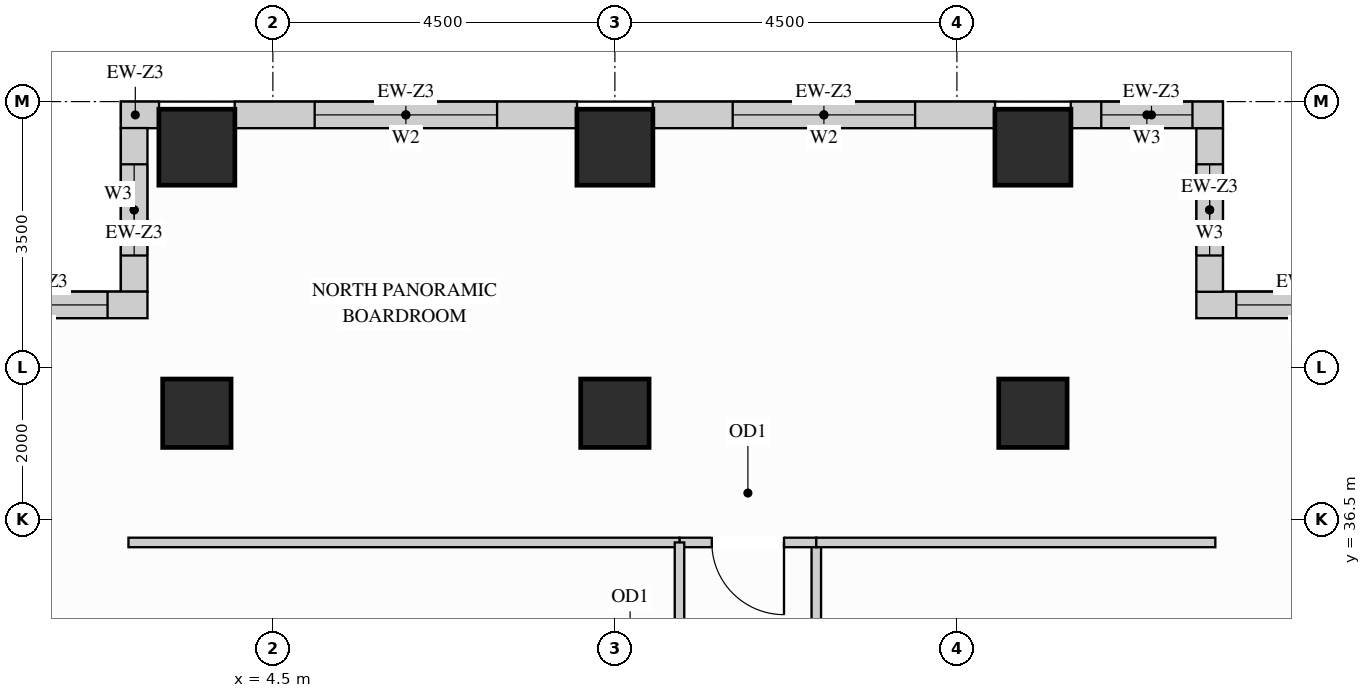
"""IFC4 building model, lengths in metres.
Left out: names, types, materials, properties, quantities, classifications, styles, units other than length and angle.
Written with IfcOpenShell. Run it as: python <this file> out.ifc"""

import sys

from ifc_helpers import new_model, si_unit, direction, frame, frame_2d, origin, origin_2d, place, context, subcontext, project, spatial, rectangle, extrude, source, transform, mapped, element, fill, save


model = new_model("IFC4")
c1 = context("Model", 3, precision=1e-05, world=origin(), true_north=direction((0.0, 1.0)))
c2 = subcontext(c1, "Body", "Model", "MODEL_VIEW")
j1 = project(units=[si_unit("LENGTHUNIT", "METRE"), si_unit("PLANEANGLEUNIT", "RADIAN")], contexts=[c1])
p1 = place(None, origin())
s1 = spatial("IfcSite", under=j1, at=p1, CompositionType="ELEMENT")
p2 = place(p1, origin())
s2 = spatial("IfcBuilding", under=s1, at=p2, CompositionType="ELEMENT")
p3 = place(p2, frame((0.0, 0.0, 179.1)))
s3 = spatial("IfcBuildingStorey", under=s2, at=p3, CompositionType="ELEMENT", Elevation=179.1)
m1 = source(origin(), c2, "Body", "SweptSolid", [
    extrude(rectangle(XDim=0.9, YDim=0.9, at=origin_2d()), origin(), (0.0, 0.0, 1.0), 3.4),
])
for number, where, z_axis, x_axis in (
    (1, (14.5, 37.9, 0.0), (0.0, 0.0, 1.0), (1.0, 0.0, 0.0)),
    (2, (3.5, 37.9, 0.0), (0.0, 0.0, 1.0), (1.0, 0.0, 0.0)),
    (3, (9.0, 37.9, 0.0), (0.0, 0.0, 1.0), (1.0, 0.0, 0.0)),
):
    element("IfcColumn", number, at=place(p3, frame(where, z_axis=z_axis, x_axis=x_axis)), inside=s3, PredefinedType="COLUMN", context=c2, shape_type="MappedRepresentation", body=[
        mapped(m1, transform((0.0, 0.0, 0.0), x_axis=(1.0, 0.0, 0.0), y_axis=(0.0, 1.0, 0.0), z_axis=(0.0, 0.0, 1.0))),
    ])
m2 = source(origin(), c2, "Body", "SweptSolid", [
    extrude(rectangle(XDim=1.0, YDim=1.0, at=origin_2d()), origin(), (0.0, 0.0, 1.0), 3.4),
])
for number, where, z_axis, x_axis in (
    (4, (14.5, 41.4, 0.0), (0.0, 0.0, 1.0), (1.0, 0.0, 0.0)),
    (5, (3.5, 41.4, 0.0), (0.0, 0.0, 1.0), (1.0, 0.0, 0.0)),
    (6, (9.0, 41.4, 0.0), (0.0, 0.0, 1.0), (1.0, 0.0, 0.0)),
):
    element("IfcColumn", number, at=place(p3, frame(where, z_axis=z_axis, x_axis=x_axis)), inside=s3, PredefinedType="COLUMN", context=c2, shape_type="MappedRepresentation", body=[
        mapped(m2, transform((0.0, 0.0, 0.0), x_axis=(1.0, 0.0, 0.0), y_axis=(0.0, 1.0, 0.0), z_axis=(0.0, 0.0, 1.0))),
    ])
p4 = place(p3, frame((19.5, 39.325, 0.0), z_axis=(0.0, 0.0, 1.0), x_axis=(-1.0, 0.0, 0.0)))
e7 = element("IfcWall", 7, at=p4, inside=s3, PredefinedType="SOLIDWALL", context=c2, shape_type="SweptSolid", body=[
    extrude(rectangle(XDim=2.85, YDim=0.35, at=frame_2d((1.425, 0.0))), origin(), (0.0, 0.0, 1.0), 3.385),
])
p5 = place(p4, frame((0.525, 0.0, 0.78)))
e8 = element("IfcOpeningElement", 8, at=p5, cuts=e7, PredefinedType="OPENING", context=c2, shape_type="SweptSolid", body=[
    extrude(rectangle(XDim=1.8, YDim=2.1, at=frame_2d((0.9, 1.05))), frame((0.0, 0.185, 0.0), z_axis=(0.0, -1.0, 0.0), x_axis=(1.0, 0.0, 0.0)), (0.0, 0.0, 1.0), 0.37),
])
p6 = place(p3, frame((16.825, 39.498, 0.0), z_axis=(0.0, 0.0, 1.0), x_axis=(0.0, 1.0, 0.0)))
e9 = element("IfcWall", 9, at=p6, inside=s3, PredefinedType="SOLIDWALL", context=c2, shape_type="SweptSolid", body=[
    extrude(rectangle(XDim=2.154, YDim=0.35, at=frame_2d((1.077, 0.0))), origin(), (0.0, 0.0, 1.0), 3.385),
])
p7 = place(p6, frame((0.477, 0.0, 0.78)))
e10 = element("IfcOpeningElement", 10, at=p7, cuts=e9, PredefinedType="OPENING", context=c2, shape_type="SweptSolid", body=[
    extrude(rectangle(XDim=1.2, YDim=2.1, at=frame_2d((0.6, 1.05))), frame((0.0, 0.185, 0.0), z_axis=(0.0, -1.0, 0.0), x_axis=(1.0, 0.0, 0.0)), (0.0, 0.0, 1.0), 0.37),
])
p8 = place(p3, frame((17.0, 41.825, 0.0), z_axis=(0.0, 0.0, 1.0), x_axis=(-1.0, 0.0, 0.0)))
e11 = element("IfcWall", 11, at=p8, inside=s3, PredefinedType="SOLIDWALL", context=c2, shape_type="SweptSolid", body=[
    extrude(rectangle(XDim=2.002, YDim=0.35, at=frame_2d((1.001, 0.0))), origin(), (0.0, 0.0, 1.0), 3.385),
])
p9 = place(p8, frame((0.401, 0.0, 0.78)))
e12 = element("IfcOpeningElement", 12, at=p9, cuts=e11, PredefinedType="OPENING", context=c2, shape_type="SweptSolid", body=[
    extrude(rectangle(XDim=1.2, YDim=2.1, at=frame_2d((0.6, 1.05))), frame((0.0, 0.185, 0.0), z_axis=(0.0, -1.0, 0.0), x_axis=(1.0, 0.0, 0.0)), (0.0, 0.0, 1.0), 0.37),
])
p10 = place(p3, frame((14.002, 41.825, 0.0), z_axis=(0.0, 0.0, 1.0), x_axis=(-1.0, 0.0, 0.0)))
e13 = element("IfcWall", 13, at=p10, inside=s3, PredefinedType="SOLIDWALL", context=c2, shape_type="SweptSolid", body=[
    extrude(rectangle(XDim=4.504, YDim=0.35, at=frame_2d((2.252, 0.0))), origin(), (0.0, 0.0, 1.0), 2.612),
])
p11 = place(p10, frame((1.052, 0.0, 0.78)))
e14 = element("IfcOpeningElement", 14, at=p11, cuts=e13, PredefinedType="OPENING", context=c2, shape_type="SweptSolid", body=[
    extrude(rectangle(XDim=2.4, YDim=1.652, at=frame_2d((1.2, 0.826))), frame((0.0, 0.185, 0.0), z_axis=(0.0, -1.0, 0.0), x_axis=(1.0, 0.0, 0.0)), (0.0, 0.0, 1.0), 0.37),
])
p12 = place(p3, frame((8.502, 41.825, 0.0), z_axis=(0.0, 0.0, 1.0), x_axis=(-1.0, 0.0, 0.0)))
e15 = element("IfcWall", 15, at=p12, inside=s3, PredefinedType="SOLIDWALL", context=c2, shape_type="SweptSolid", body=[
    extrude(rectangle(XDim=4.504, YDim=0.35, at=frame_2d((2.252, 0.0))), origin(), (0.0, 0.0, 1.0), 2.612),
])
p13 = place(p12, frame((1.052, 0.0, 0.78)))
e16 = element("IfcOpeningElement", 16, at=p13, cuts=e15, PredefinedType="OPENING", context=c2, shape_type="SweptSolid", body=[
    extrude(rectangle(XDim=2.4, YDim=1.652, at=frame_2d((1.2, 0.826))), frame((0.0, 0.185, 0.0), z_axis=(0.0, -1.0, 0.0), x_axis=(1.0, 0.0, 0.0)), (0.0, 0.0, 1.0), 0.37),
])
m3 = source(origin(), c2, "Body", "SweptSolid", [
    extrude(rectangle(XDim=0.502, YDim=0.35, at=frame_2d((0.251, 0.0))), origin(), (0.0, 0.0, 1.0), 3.385),
])
p14 = place(p3, frame((3.002, 41.825, 0.0), z_axis=(0.0, 0.0, 1.0), x_axis=(-1.0, 0.0, 0.0)))
e17 = element("IfcWall", 17, at=p14, inside=s3, PredefinedType="SOLIDWALL", context=c2, shape_type="MappedRepresentation", body=[
    mapped(m3, transform((0.0, 0.0, 0.0), x_axis=(1.0, 0.0, 0.0), y_axis=(0.0, 1.0, 0.0), z_axis=(0.0, 0.0, 1.0))),
])
p15 = place(p3, frame((2.675, 41.652, 0.0), z_axis=(0.0, 0.0, 1.0), x_axis=(0.0, -1.0, 0.0)))
e18 = element("IfcWall", 18, at=p15, inside=s3, PredefinedType="SOLIDWALL", context=c2, shape_type="SweptSolid", body=[
    extrude(rectangle(XDim=2.154, YDim=0.35, at=frame_2d((1.077, 0.0))), origin(), (0.0, 0.0, 1.0), 3.385),
])
p16 = place(p15, frame((0.477, 0.0, 0.78)))
e19 = element("IfcOpeningElement", 19, at=p16, cuts=e18, PredefinedType="OPENING", context=c2, shape_type="SweptSolid", body=[
    extrude(rectangle(XDim=1.2, YDim=2.1, at=frame_2d((0.6, 1.05))), frame((0.0, 0.185, 0.0), z_axis=(0.0, -1.0, 0.0), x_axis=(1.0, 0.0, 0.0)), (0.0, 0.0, 1.0), 0.37),
])
p17 = place(p3, frame((2.85, 39.325, 0.0), z_axis=(0.0, 0.0, 1.0), x_axis=(-1.0, 0.0, 0.0)))
e20 = element("IfcWall", 20, at=p17, inside=s3, PredefinedType="SOLIDWALL", context=c2, shape_type="SweptSolid", body=[
    extrude(rectangle(XDim=2.85, YDim=0.35, at=frame_2d((1.425, 0.0))), origin(), (0.0, 0.0, 1.0), 3.385),
])
p18 = place(p17, frame((0.525, 0.0, 0.78)))
e21 = element("IfcOpeningElement", 21, at=p18, cuts=e20, PredefinedType="OPENING", context=c2, shape_type="SweptSolid", body=[
    extrude(rectangle(XDim=1.8, YDim=2.1, at=frame_2d((0.9, 1.05))), frame((0.0, 0.185, 0.0), z_axis=(0.0, -1.0, 0.0), x_axis=(1.0, 0.0, 0.0)), (0.0, 0.0, 1.0), 0.37),
])
p19 = place(p3, frame((11.65, 32.55, 0.0), z_axis=(0.0, 0.0, 1.0), x_axis=(0.0, 1.0, 0.0)))
e22 = element("IfcWall", 22, at=p19, inside=s3, PredefinedType="PARTITIONING", context=c2, shape_type="SweptSolid", body=[
    extrude(rectangle(XDim=3.65, YDim=0.125, at=frame_2d((1.825, 0.0))), origin(), (0.0, 0.0, 1.0), 3.385),
])
p20 = place(p19, frame((1.35, 0.0, 0.0)))
e23 = element("IfcOpeningElement", 23, at=p20, cuts=e22, PredefinedType="OPENING", context=c2, shape_type="SweptSolid", body=[
    extrude(rectangle(XDim=0.95, YDim=2.15, at=frame_2d((0.475, 1.075))), frame((0.0, 0.073, 0.0), z_axis=(0.0, -1.0, 0.0), x_axis=(1.0, 0.0, 0.0)), (0.0, 0.0, 1.0), 0.145),
])
p21 = place(p3, frame((9.85, 36.2, 0.0), z_axis=(0.0, 0.0, 1.0), x_axis=(1.0, 0.0, 0.0)))
e24 = element("IfcWall", 24, at=p21, inside=s3, PredefinedType="PARTITIONING", context=c2, shape_type="SweptSolid", body=[
    extrude(rectangle(XDim=1.8, YDim=0.125, at=frame_2d((0.9, 0.0))), origin(), (0.0, 0.0, 1.0), 2.848),
])
p22 = place(p21, frame((0.425, 0.0, 0.0)))
e25 = element("IfcOpeningElement", 25, at=p22, cuts=e24, PredefinedType="OPENING", context=c2, shape_type="SweptSolid", body=[
    extrude(rectangle(XDim=0.95, YDim=2.15, at=frame_2d((0.475, 1.075))), frame((0.0, 0.073, 0.0), z_axis=(0.0, -1.0, 0.0), x_axis=(1.0, 0.0, 0.0)), (0.0, 0.0, 1.0), 0.145),
])
m4 = source(origin(), c2, "Body", "SweptSolid", [
    extrude(rectangle(XDim=5.25, YDim=0.125, at=frame_2d((2.625, 0.0))), origin(), (0.0, 0.0, 1.0), 2.848),
])
p23 = place(p3, frame((11.65, 36.2, 0.0), z_axis=(0.0, 0.0, 1.0), x_axis=(1.0, 0.0, 0.0)))
e26 = element("IfcWall", 26, at=p23, inside=s3, PredefinedType="PARTITIONING", context=c2, shape_type="MappedRepresentation", body=[
    mapped(m4, transform((0.0, 0.0, 0.0), x_axis=(1.0, 0.0, 0.0), y_axis=(0.0, 1.0, 0.0), z_axis=(0.0, 0.0, 1.0))),
])
m5 = source(origin(), c2, "Body", "SweptSolid", [
    extrude(rectangle(XDim=7.25, YDim=0.125, at=frame_2d((3.625, 0.0))), origin(), (0.0, 0.0, 1.0), 2.848),
])
p24 = place(p3, frame((2.6, 36.2, 0.0), z_axis=(0.0, 0.0, 1.0), x_axis=(1.0, 0.0, 0.0)))
e27 = element("IfcWall", 27, at=p24, inside=s3, PredefinedType="PARTITIONING", context=c2, shape_type="MappedRepresentation", body=[
    mapped(m5, transform((0.0, 0.0, 0.0), x_axis=(1.0, 0.0, 0.0), y_axis=(0.0, 1.0, 0.0), z_axis=(0.0, 0.0, 1.0))),
])
p25 = place(p3, frame((9.85, 32.55, 0.0), z_axis=(0.0, 0.0, 1.0), x_axis=(0.0, 1.0, 0.0)))
e28 = element("IfcWall", 28, at=p25, inside=s3, PredefinedType="PARTITIONING", context=c2, shape_type="SweptSolid", body=[
    extrude(rectangle(XDim=3.65, YDim=0.125, at=frame_2d((1.825, 0.0))), origin(), (0.0, 0.0, 1.0), 3.385),
])
p26 = place(p25, frame((1.35, 0.0, 0.0)))
e29 = element("IfcOpeningElement", 29, at=p26, cuts=e28, PredefinedType="OPENING", context=c2, shape_type="SweptSolid", body=[
    extrude(rectangle(XDim=0.95, YDim=2.15, at=frame_2d((0.475, 1.075))), frame((0.0, 0.073, 0.0), z_axis=(0.0, -1.0, 0.0), x_axis=(1.0, 0.0, 0.0)), (0.0, 0.0, 1.0), 0.145),
])
m6 = source(origin(), c2, "Body", "SweptSolid", [
    extrude(rectangle(XDim=0.95, YDim=2.15, at=frame_2d((0.475, 1.075))), frame((0.0, 0.025, 0.0), z_axis=(0.0, -1.0, 0.0), x_axis=(1.0, 0.0, 0.0)), (0.0, 0.0, 1.0), 0.05),
])
p27 = place(p22, origin())
e30 = element("IfcDoor", 30, at=p27, inside=s3, OperationType="SINGLE_SWING_RIGHT", PredefinedType="DOOR", context=c2, shape_type="MappedRepresentation", body=[
    mapped(m6, transform((0.0, 0.0, 0.0), x_axis=(1.0, 0.0, 0.0), y_axis=(0.0, 1.0, 0.0), z_axis=(0.0, 0.0, 1.0))),
])
fill(e25, e30)
m7 = source(origin(), c2, "Body", "SweptSolid", [
    extrude(rectangle(XDim=1.8, YDim=2.1, at=frame_2d((0.9, 1.05))), frame((0.0, 0.03, 0.0), z_axis=(0.0, -1.0, 0.0), x_axis=(1.0, 0.0, 0.0)), (0.0, 0.0, 1.0), 0.06),
])
p28 = place(p5, origin())
e31 = element("IfcWindow", 31, at=p28, inside=s3, PartitioningType="SINGLE_PANEL", PredefinedType="WINDOW", context=c2, shape_type="MappedRepresentation", body=[
    mapped(m7, transform((0.0, 0.0, 0.0), x_axis=(1.0, 0.0, 0.0), y_axis=(0.0, 1.0, 0.0), z_axis=(0.0, 0.0, 1.0))),
])
fill(e8, e31)
p29 = place(p18, origin())
e32 = element("IfcWindow", 32, at=p29, inside=s3, PartitioningType="SINGLE_PANEL", PredefinedType="WINDOW", context=c2, shape_type="MappedRepresentation", body=[
    mapped(m7, transform((0.0, 0.0, 0.0), x_axis=(1.0, 0.0, 0.0), y_axis=(0.0, 1.0, 0.0), z_axis=(0.0, 0.0, 1.0))),
])
fill(e21, e32)
m8 = source(origin(), c2, "Body", "SweptSolid", [
    extrude(rectangle(XDim=2.4, YDim=1.652, at=frame_2d((1.2, 0.826))), frame((0.0, 0.03, 0.0), z_axis=(0.0, -1.0, 0.0), x_axis=(1.0, 0.0, 0.0)), (0.0, 0.0, 1.0), 0.06),
])
p30 = place(p11, origin())
e33 = element("IfcWindow", 33, at=p30, inside=s3, PartitioningType="SINGLE_PANEL", PredefinedType="WINDOW", context=c2, shape_type="MappedRepresentation", body=[
    mapped(m8, transform((0.0, 0.0, 0.0), x_axis=(1.0, 0.0, 0.0), y_axis=(0.0, 1.0, 0.0), z_axis=(0.0, 0.0, 1.0))),
])
fill(e14, e33)
p31 = place(p13, origin())
e34 = element("IfcWindow", 34, at=p31, inside=s3, PartitioningType="SINGLE_PANEL", PredefinedType="WINDOW", context=c2, shape_type="MappedRepresentation", body=[
    mapped(m8, transform((0.0, 0.0, 0.0), x_axis=(1.0, 0.0, 0.0), y_axis=(0.0, 1.0, 0.0), z_axis=(0.0, 0.0, 1.0))),
])
fill(e16, e34)
m9 = source(origin(), c2, "Body", "SweptSolid", [
    extrude(rectangle(XDim=1.2, YDim=2.1, at=frame_2d((0.6, 1.05))), frame((0.0, 0.03, 0.0), z_axis=(0.0, -1.0, 0.0), x_axis=(1.0, 0.0, 0.0)), (0.0, 0.0, 1.0), 0.06),
])
p32 = place(p7, origin())
e35 = element("IfcWindow", 35, at=p32, inside=s3, PartitioningType="SINGLE_PANEL", PredefinedType="WINDOW", context=c2, shape_type="MappedRepresentation", body=[
    mapped(m9, transform((0.0, 0.0, 0.0), x_axis=(1.0, 0.0, 0.0), y_axis=(0.0, 1.0, 0.0), z_axis=(0.0, 0.0, 1.0))),
])
fill(e10, e35)
p33 = place(p9, origin())
e36 = element("IfcWindow", 36, at=p33, inside=s3, PartitioningType="SINGLE_PANEL", PredefinedType="WINDOW", context=c2, shape_type="MappedRepresentation", body=[
    mapped(m9, transform((0.0, 0.0, 0.0), x_axis=(1.0, 0.0, 0.0), y_axis=(0.0, 1.0, 0.0), z_axis=(0.0, 0.0, 1.0))),
])
fill(e12, e36)
p34 = place(p16, origin())
e37 = element("IfcWindow", 37, at=p34, inside=s3, PartitioningType="SINGLE_PANEL", PredefinedType="WINDOW", context=c2, shape_type="MappedRepresentation", body=[
    mapped(m9, transform((0.0, 0.0, 0.0), x_axis=(1.0, 0.0, 0.0), y_axis=(0.0, 1.0, 0.0), z_axis=(0.0, 0.0, 1.0))),
])
fill(e19, e37)
save(model, sys.argv[1])
